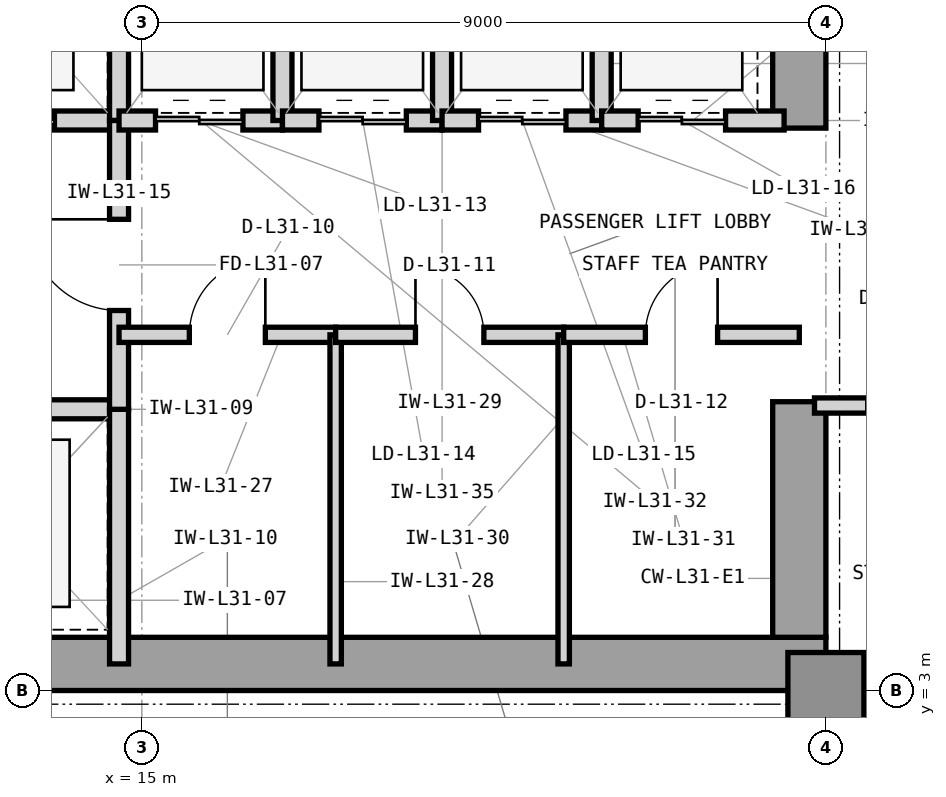
"""IFC4 building model, lengths in metres.
Left out: names, types, materials, properties, quantities, classifications, styles, units other than length and angle.
Written with IfcOpenShell. Run it as: python <this file> out.ifc"""

import sys

from ifc_helpers import new_model, si_unit, direction, frame, frame_2d, origin, origin_2d, place, context, subcontext, project, spatial, rectangle, extrude, element, fill, save


model = new_model("IFC4")
c1 = context("Model", 3, precision=1e-05, world=origin(), true_north=direction((0.0, 1.0)))
c2 = subcontext(c1, "Body", "Model", "MODEL_VIEW")
j1 = project(units=[si_unit("LENGTHUNIT", "METRE"), si_unit("PLANEANGLEUNIT", "RADIAN")], contexts=[c1])
p1 = place(None, origin())
s1 = spatial("IfcSite", under=j1, at=p1, CompositionType="ELEMENT")
p2 = place(p1, origin())
s2 = spatial("IfcBuilding", under=s1, at=p2, CompositionType="ELEMENT")
p3 = place(p2, frame((0.0, 0.0, 132.3)))
s3 = spatial("IfcBuildingStorey", under=s2, at=p3, CompositionType="ELEMENT", Elevation=132.3)
p4 = place(p3, frame((7.475, 3.35, 0.0), z_axis=(0.0, 0.0, 1.0), x_axis=(1.0, 0.0, 0.0)))
e1 = element("IfcWall", 1, at=p4, inside=s3, PredefinedType="SHEAR", context=c2, shape_type="SweptSolid", body=[
    extrude(rectangle(XDim=16.525, YDim=0.7, at=frame_2d((8.262, 0.0))), origin(), (0.0, 0.0, 1.0), 3.9),
])
p5 = place(p3, frame((23.65, 3.7, 0.0), z_axis=(0.0, 0.0, 1.0), x_axis=(0.0, 1.0, 0.0)))
e2 = element("IfcWall", 2, at=p5, inside=s3, PredefinedType="SHEAR", context=c2, shape_type="SweptSolid", body=[
    extrude(rectangle(XDim=3.1, YDim=0.7, at=frame_2d((1.55, 0.0))), origin(), (0.0, 0.0, 1.0), 3.9),
])
p6 = place(p3, frame((23.65, 10.4, 0.0), z_axis=(0.0, 0.0, 1.0), x_axis=(0.0, 1.0, 0.0)))
e3 = element("IfcWall", 3, at=p6, inside=s3, PredefinedType="SHEAR", context=c2, shape_type="SweptSolid", body=[
    extrude(rectangle(XDim=3.2, YDim=0.7, at=frame_2d((1.6, 0.0))), origin(), (0.0, 0.0, 1.0), 3.9),
])
p7 = place(p3, frame((24.0, 3.0, 0.0), z_axis=(0.0, 0.0, 1.0), x_axis=(1.0, 0.0, 0.0)))
e4 = element("IfcColumn", 4, at=p7, inside=s3, PredefinedType="COLUMN", context=c2, shape_type="SweptSolid", body=[
    extrude(rectangle(XDim=1.0, YDim=1.0, at=origin_2d()), origin(), (0.0, 0.0, 1.0), 3.9),
])
p8 = place(p3, frame((23.9, 3.21, 0.0), z_axis=(0.0, 0.0, 1.0), x_axis=(1.0, 0.0, 0.0)))
e5 = element("IfcWall", 5, at=p8, inside=s3, PredefinedType="STANDARD", context=c2, shape_type="SweptSolid", body=[
    extrude(rectangle(XDim=34.5, YDim=0.42, at=frame_2d((17.25, 0.0))), origin(), (0.0, 0.0, 1.0), 3.7),
])
p9 = place(p8, frame((11.071, 0.0, 0.85)))
e6 = element("IfcOpeningElement", 6, at=p9, cuts=e5, PredefinedType="OPENING", context=c2, shape_type="SweptSolid", body=[
    extrude(rectangle(XDim=2.5, YDim=2.25, at=frame_2d((1.25, 1.125))), frame((0.0, 0.22, 0.0), z_axis=(0.0, -1.0, 0.0), x_axis=(1.0, 0.0, 0.0)), (0.0, 0.0, 1.0), 0.44),
])
p10 = place(p8, frame((1.1, 0.0, 0.85)))
e7 = element("IfcOpeningElement", 7, at=p10, cuts=e5, PredefinedType="OPENING", context=c2, shape_type="SweptSolid", body=[
    extrude(rectangle(XDim=1.2, YDim=2.25, at=frame_2d((0.6, 1.125))), frame((0.0, 0.22, 0.0), z_axis=(0.0, -1.0, 0.0), x_axis=(1.0, 0.0, 0.0)), (0.0, 0.0, 1.0), 0.44),
])
p11 = place(p8, frame((5.036, 0.0, 0.85)))
e8 = element("IfcOpeningElement", 8, at=p11, cuts=e5, PredefinedType="OPENING", context=c2, shape_type="SweptSolid", body=[
    extrude(rectangle(XDim=2.5, YDim=2.25, at=frame_2d((1.25, 1.125))), frame((0.0, 0.22, 0.0), z_axis=(0.0, -1.0, 0.0), x_axis=(1.0, 0.0, 0.0)), (0.0, 0.0, 1.0), 0.44),
])
p12 = place(p8, frame((19.786, 0.0, 0.85)))
e9 = element("IfcOpeningElement", 9, at=p12, cuts=e5, PredefinedType="OPENING", context=c2, shape_type="SweptSolid", body=[
    extrude(rectangle(XDim=2.5, YDim=2.25, at=frame_2d((1.25, 1.125))), frame((0.0, 0.22, 0.0), z_axis=(0.0, -1.0, 0.0), x_axis=(1.0, 0.0, 0.0)), (0.0, 0.0, 1.0), 0.44),
])
p13 = place(p8, frame((25.086, 0.0, 0.85)))
e10 = element("IfcOpeningElement", 10, at=p13, cuts=e5, PredefinedType="OPENING", context=c2, shape_type="SweptSolid", body=[
    extrude(rectangle(XDim=1.2, YDim=2.25, at=frame_2d((0.6, 1.125))), frame((0.0, 0.22, 0.0), z_axis=(0.0, -1.0, 0.0), x_axis=(1.0, 0.0, 0.0)), (0.0, 0.0, 1.0), 0.44),
])
p14 = place(p3, frame((11.82, 6.7, 0.0), z_axis=(0.0, 0.0, 1.0), x_axis=(1.0, 0.0, 0.0)))
e11 = element("IfcWall", 11, at=p14, inside=s3, PredefinedType="PARTITIONING", context=c2, shape_type="SweptSolid", body=[
    extrude(rectangle(XDim=2.88, YDim=0.25, at=frame_2d((1.44, 0.0))), origin(), (0.0, 0.0, 1.0), 3.233),
])
p15 = place(p14, frame((0.85, 0.0, 0.0)))
e12 = element("IfcOpeningElement", 12, at=p15, cuts=e11, PredefinedType="OPENING", context=c2, shape_type="SweptSolid", body=[
    extrude(rectangle(XDim=1.1, YDim=2.25, at=frame_2d((0.55, 1.125))), frame((0.0, 0.135, 0.0), z_axis=(0.0, -1.0, 0.0), x_axis=(1.0, 0.0, 0.0)), (0.0, 0.0, 1.0), 0.27),
])
p16 = place(p3, frame((14.7, 3.35, 0.0), z_axis=(0.0, 0.0, 1.0), x_axis=(0.0, 1.0, 0.0)))
e13 = element("IfcWall", 13, at=p16, inside=s3, PredefinedType="PARTITIONING", context=c2, shape_type="SweptSolid", body=[
    extrude(rectangle(XDim=3.35, YDim=0.25, at=frame_2d((1.675, 0.0))), origin(), (0.0, 0.0, 1.0), 3.69),
])
p17 = place(p3, frame((11.95, 10.5, 0.0), z_axis=(0.0, 0.0, 1.0), x_axis=(1.0, 0.0, 0.0)))
e14 = element("IfcWall", 14, at=p17, inside=s3, PredefinedType="PARTITIONING", context=c2, shape_type="SweptSolid", body=[
    extrude(rectangle(XDim=2.75, YDim=0.25, at=frame_2d((1.375, 0.0))), origin(), (0.0, 0.0, 1.0), 3.233),
])
p18 = place(p17, frame((0.8, 0.0, 0.0)))
e15 = element("IfcOpeningElement", 15, at=p18, cuts=e14, PredefinedType="OPENING", context=c2, shape_type="SweptSolid", body=[
    extrude(rectangle(XDim=1.1, YDim=2.25, at=frame_2d((0.55, 1.125))), frame((0.0, 0.135, 0.0), z_axis=(0.0, -1.0, 0.0), x_axis=(1.0, 0.0, 0.0)), (0.0, 0.0, 1.0), 0.27),
])
p19 = place(p3, frame((14.7, 10.5, 0.0), z_axis=(0.0, 0.0, 1.0), x_axis=(0.0, 1.0, 0.0)))
e16 = element("IfcWall", 16, at=p19, inside=s3, PredefinedType="PARTITIONING", context=c2, shape_type="SweptSolid", body=[
    extrude(rectangle(XDim=3.0, YDim=0.25, at=frame_2d((1.5, 0.0))), origin(), (0.0, 0.0, 1.0), 3.69),
])
p20 = place(p3, frame((14.7, 6.7, 0.0), z_axis=(0.0, 0.0, 1.0), x_axis=(0.0, 1.0, 0.0)))
e17 = element("IfcWall", 17, at=p20, inside=s3, PredefinedType="PARTITIONING", context=c2, shape_type="SweptSolid", body=[
    extrude(rectangle(XDim=3.8, YDim=0.25, at=frame_2d((1.9, 0.0))), origin(), (0.0, 0.0, 1.0), 3.69),
])
p21 = place(p20, frame((1.3, 0.0, 0.0)))
e18 = element("IfcOpeningElement", 18, at=p21, cuts=e17, PredefinedType="OPENING", context=c2, shape_type="SweptSolid", body=[
    extrude(rectangle(XDim=1.2, YDim=2.2, at=frame_2d((0.6, 1.1))), frame((0.0, 0.135, 0.0), z_axis=(0.0, -1.0, 0.0), x_axis=(1.0, 0.0, 0.0)), (0.0, 0.0, 1.0), 0.27),
])
p22 = place(p3, frame((14.7, 7.68, 0.0), z_axis=(0.0, 0.0, 1.0), x_axis=(1.0, 0.0, 0.0)))
e19 = element("IfcWall", 19, at=p22, inside=s3, PredefinedType="PARTITIONING", context=c2, shape_type="SweptSolid", body=[
    extrude(rectangle(XDim=2.85, YDim=0.2, at=frame_2d((1.425, 0.0))), origin(), (0.0, 0.0, 1.0), 3.69),
])
p23 = place(p22, frame((0.925, 0.0, 0.0)))
e20 = element("IfcOpeningElement", 20, at=p23, cuts=e19, PredefinedType="OPENING", context=c2, shape_type="SweptSolid", body=[
    extrude(rectangle(XDim=1.0, YDim=2.15, at=frame_2d((0.5, 1.075))), frame((0.0, 0.11, 0.0), z_axis=(0.0, -1.0, 0.0), x_axis=(1.0, 0.0, 0.0)), (0.0, 0.0, 1.0), 0.22),
])
p24 = place(p3, frame((17.55, 3.35, 0.0), z_axis=(0.0, 0.0, 1.0), x_axis=(0.0, 1.0, 0.0)))
e21 = element("IfcWall", 21, at=p24, inside=s3, PredefinedType="PARTITIONING", context=c2, shape_type="SweptSolid", body=[
    extrude(rectangle(XDim=4.33, YDim=0.15, at=frame_2d((2.165, 0.0))), origin(), (0.0, 0.0, 1.0), 3.69),
])
p25 = place(p3, frame((17.55, 7.68, 0.0), z_axis=(0.0, 0.0, 1.0), x_axis=(1.0, 0.0, 0.0)))
e22 = element("IfcWall", 22, at=p25, inside=s3, PredefinedType="PARTITIONING", context=c2, shape_type="SweptSolid", body=[
    extrude(rectangle(XDim=3.0, YDim=0.2, at=frame_2d((1.5, 0.0))), origin(), (0.0, 0.0, 1.0), 3.69),
])
p26 = place(p25, frame((1.05, 0.0, 0.0)))
e23 = element("IfcOpeningElement", 23, at=p26, cuts=e22, PredefinedType="OPENING", context=c2, shape_type="SweptSolid", body=[
    extrude(rectangle(XDim=0.9, YDim=2.1, at=frame_2d((0.45, 1.05))), frame((0.0, 0.11, 0.0), z_axis=(0.0, -1.0, 0.0), x_axis=(1.0, 0.0, 0.0)), (0.0, 0.0, 1.0), 0.22),
])
p27 = place(p3, frame((20.55, 3.35, 0.0), z_axis=(0.0, 0.0, 1.0), x_axis=(0.0, 1.0, 0.0)))
e24 = element("IfcWall", 24, at=p27, inside=s3, PredefinedType="PARTITIONING", context=c2, shape_type="SweptSolid", body=[
    extrude(rectangle(XDim=4.33, YDim=0.15, at=frame_2d((2.165, 0.0))), origin(), (0.0, 0.0, 1.0), 3.69),
])
p28 = place(p3, frame((20.55, 7.68, 0.0), z_axis=(0.0, 0.0, 1.0), x_axis=(1.0, 0.0, 0.0)))
e25 = element("IfcWall", 25, at=p28, inside=s3, PredefinedType="PARTITIONING", context=c2, shape_type="SweptSolid", body=[
    extrude(rectangle(XDim=3.1, YDim=0.2, at=frame_2d((1.55, 0.0))), origin(), (0.0, 0.0, 1.0), 3.69),
])
p29 = place(p28, frame((1.075, 0.0, 0.0)))
e26 = element("IfcOpeningElement", 26, at=p29, cuts=e25, PredefinedType="OPENING", context=c2, shape_type="SweptSolid", body=[
    extrude(rectangle(XDim=0.95, YDim=2.1, at=frame_2d((0.475, 1.05))), frame((0.0, 0.11, 0.0), z_axis=(0.0, -1.0, 0.0), x_axis=(1.0, 0.0, 0.0)), (0.0, 0.0, 1.0), 0.22),
])
p30 = place(p3, frame((14.7, 10.5, 0.0), z_axis=(0.0, 0.0, 1.0), x_axis=(1.0, 0.0, 0.0)))
e27 = element("IfcWall", 27, at=p30, inside=s3, PredefinedType="PARTITIONING", context=c2, shape_type="SweptSolid", body=[
    extrude(rectangle(XDim=2.15, YDim=0.25, at=frame_2d((1.075, 0.0))), origin(), (0.0, 0.0, 1.0), 3.233),
])
p31 = place(p30, frame((0.48, 0.0, 0.0)))
e28 = element("IfcOpeningElement", 28, at=p31, cuts=e27, PredefinedType="OPENING", context=c2, shape_type="SweptSolid", body=[
    extrude(rectangle(XDim=1.15, YDim=2.25, at=frame_2d((0.575, 1.125))), frame((0.0, 0.135, 0.0), z_axis=(0.0, -1.0, 0.0), x_axis=(1.0, 0.0, 0.0)), (0.0, 0.0, 1.0), 0.27),
])
p32 = place(p3, frame((16.85, 10.5, 0.0), z_axis=(0.0, 0.0, 1.0), x_axis=(0.0, 1.0, 0.0)))
e29 = element("IfcWall", 29, at=p32, inside=s3, PredefinedType="PARTITIONING", context=c2, shape_type="SweptSolid", body=[
    extrude(rectangle(XDim=3.0, YDim=0.25, at=frame_2d((1.5, 0.0))), origin(), (0.0, 0.0, 1.0), 3.69),
])
p33 = place(p3, frame((16.85, 10.5, 0.0), z_axis=(0.0, 0.0, 1.0), x_axis=(1.0, 0.0, 0.0)))
e30 = element("IfcWall", 30, at=p33, inside=s3, PredefinedType="PARTITIONING", context=c2, shape_type="SweptSolid", body=[
    extrude(rectangle(XDim=2.1, YDim=0.25, at=frame_2d((1.05, 0.0))), origin(), (0.0, 0.0, 1.0), 3.233),
])
p34 = place(p33, frame((0.48, 0.0, 0.0)))
e31 = element("IfcOpeningElement", 31, at=p34, cuts=e30, PredefinedType="OPENING", context=c2, shape_type="SweptSolid", body=[
    extrude(rectangle(XDim=1.15, YDim=2.25, at=frame_2d((0.575, 1.125))), frame((0.0, 0.135, 0.0), z_axis=(0.0, -1.0, 0.0), x_axis=(1.0, 0.0, 0.0)), (0.0, 0.0, 1.0), 0.27),
])
p35 = place(p3, frame((18.95, 10.5, 0.0), z_axis=(0.0, 0.0, 1.0), x_axis=(0.0, 1.0, 0.0)))
e32 = element("IfcWall", 32, at=p35, inside=s3, PredefinedType="PARTITIONING", context=c2, shape_type="SweptSolid", body=[
    extrude(rectangle(XDim=3.0, YDim=0.25, at=frame_2d((1.5, 0.0))), origin(), (0.0, 0.0, 1.0), 3.69),
])
p36 = place(p3, frame((18.95, 10.5, 0.0), z_axis=(0.0, 0.0, 1.0), x_axis=(1.0, 0.0, 0.0)))
e33 = element("IfcWall", 33, at=p36, inside=s3, PredefinedType="PARTITIONING", context=c2, shape_type="SweptSolid", body=[
    extrude(rectangle(XDim=2.1, YDim=0.25, at=frame_2d((1.05, 0.0))), origin(), (0.0, 0.0, 1.0), 3.233),
])
p37 = place(p36, frame((0.48, 0.0, 0.0)))
e34 = element("IfcOpeningElement", 34, at=p37, cuts=e33, PredefinedType="OPENING", context=c2, shape_type="SweptSolid", body=[
    extrude(rectangle(XDim=1.15, YDim=2.25, at=frame_2d((0.575, 1.125))), frame((0.0, 0.135, 0.0), z_axis=(0.0, -1.0, 0.0), x_axis=(1.0, 0.0, 0.0)), (0.0, 0.0, 1.0), 0.27),
])
p38 = place(p3, frame((21.05, 10.5, 0.0), z_axis=(0.0, 0.0, 1.0), x_axis=(0.0, 1.0, 0.0)))
e35 = element("IfcWall", 35, at=p38, inside=s3, PredefinedType="PARTITIONING", context=c2, shape_type="SweptSolid", body=[
    extrude(rectangle(XDim=3.0, YDim=0.25, at=frame_2d((1.5, 0.0))), origin(), (0.0, 0.0, 1.0), 3.69),
])
p39 = place(p3, frame((21.05, 10.5, 0.0), z_axis=(0.0, 0.0, 1.0), x_axis=(1.0, 0.0, 0.0)))
e36 = element("IfcWall", 36, at=p39, inside=s3, PredefinedType="PARTITIONING", context=c2, shape_type="SweptSolid", body=[
    extrude(rectangle(XDim=2.4, YDim=0.25, at=frame_2d((1.2, 0.0))), origin(), (0.0, 0.0, 1.0), 3.233),
])
p40 = place(p39, frame((0.48, 0.0, 0.0)))
e37 = element("IfcOpeningElement", 37, at=p40, cuts=e36, PredefinedType="OPENING", context=c2, shape_type="SweptSolid", body=[
    extrude(rectangle(XDim=1.15, YDim=2.25, at=frame_2d((0.575, 1.125))), frame((0.0, 0.135, 0.0), z_axis=(0.0, -1.0, 0.0), x_axis=(1.0, 0.0, 0.0)), (0.0, 0.0, 1.0), 0.27),
])
p41 = place(p3, frame((23.85, 6.75, 0.0), z_axis=(0.0, 0.0, 1.0), x_axis=(1.0, 0.0, 0.0)))
e38 = element("IfcWall", 38, at=p41, inside=s3, PredefinedType="PARTITIONING", context=c2, shape_type="SweptSolid", body=[
    extrude(rectangle(XDim=2.85, YDim=0.2, at=frame_2d((1.425, 0.0))), origin(), (0.0, 0.0, 1.0), 3.69),
])
p42 = place(p41, frame((0.7, 0.0, 0.0)))
e39 = element("IfcOpeningElement", 39, at=p42, cuts=e38, PredefinedType="OPENING", context=c2, shape_type="SweptSolid", body=[
    extrude(rectangle(XDim=1.0, YDim=2.15, at=frame_2d((0.5, 1.075))), frame((0.0, 0.11, 0.0), z_axis=(0.0, -1.0, 0.0), x_axis=(1.0, 0.0, 0.0)), (0.0, 0.0, 1.0), 0.22),
])
p43 = place(p18, origin())
e40 = element("IfcDoor", 40, at=p43, inside=s3, OperationType="DOUBLE_DOOR_SLIDING", PredefinedType="DOOR", context=c2, shape_type="SweptSolid", body=[
    extrude(rectangle(XDim=1.1, YDim=2.25, at=frame_2d((0.55, 1.125))), frame((0.0, 0.025, 0.0), z_axis=(0.0, -1.0, 0.0), x_axis=(1.0, 0.0, 0.0)), (0.0, 0.0, 1.0), 0.05),
])
fill(e15, e40)
p44 = place(p21, origin())
e41 = element("IfcDoor", 41, at=p44, inside=s3, OperationType="SINGLE_SWING_RIGHT", PredefinedType="DOOR", context=c2, shape_type="SweptSolid", body=[
    extrude(rectangle(XDim=1.2, YDim=2.2, at=frame_2d((0.6, 1.1))), frame((0.0, 0.025, 0.0), z_axis=(0.0, -1.0, 0.0), x_axis=(1.0, 0.0, 0.0)), (0.0, 0.0, 1.0), 0.05),
])
fill(e18, e41)
p45 = place(p23, origin())
e42 = element("IfcDoor", 42, at=p45, inside=s3, OperationType="SINGLE_SWING_RIGHT", PredefinedType="DOOR", context=c2, shape_type="SweptSolid", body=[
    extrude(rectangle(XDim=1.0, YDim=2.15, at=frame_2d((0.5, 1.075))), frame((0.0, 0.025, 0.0), z_axis=(0.0, -1.0, 0.0), x_axis=(1.0, 0.0, 0.0)), (0.0, 0.0, 1.0), 0.05),
])
fill(e20, e42)
p46 = place(p26, origin())
e43 = element("IfcDoor", 43, at=p46, inside=s3, OperationType="SINGLE_SWING_LEFT", PredefinedType="TRAPDOOR", context=c2, shape_type="SweptSolid", body=[
    extrude(rectangle(XDim=0.9, YDim=2.1, at=frame_2d((0.45, 1.05))), frame((0.0, 0.025, 0.0), z_axis=(0.0, -1.0, 0.0), x_axis=(1.0, 0.0, 0.0)), (0.0, 0.0, 1.0), 0.05),
])
fill(e23, e43)
p47 = place(p29, origin())
e44 = element("IfcDoor", 44, at=p47, inside=s3, OperationType="SINGLE_SWING_RIGHT", PredefinedType="DOOR", context=c2, shape_type="SweptSolid", body=[
    extrude(rectangle(XDim=0.95, YDim=2.1, at=frame_2d((0.475, 1.05))), frame((0.0, 0.025, 0.0), z_axis=(0.0, -1.0, 0.0), x_axis=(1.0, 0.0, 0.0)), (0.0, 0.0, 1.0), 0.05),
])
fill(e26, e44)
p48 = place(p31, origin())
e45 = element("IfcDoor", 45, at=p48, inside=s3, OperationType="DOUBLE_DOOR_SLIDING", PredefinedType="DOOR", context=c2, shape_type="SweptSolid", body=[
    extrude(rectangle(XDim=1.15, YDim=2.25, at=frame_2d((0.575, 1.125))), frame((0.0, 0.025, 0.0), z_axis=(0.0, -1.0, 0.0), x_axis=(1.0, 0.0, 0.0)), (0.0, 0.0, 1.0), 0.05),
])
fill(e28, e45)
p49 = place(p34, origin())
e46 = element("IfcDoor", 46, at=p49, inside=s3, OperationType="DOUBLE_DOOR_SLIDING", PredefinedType="DOOR", context=c2, shape_type="SweptSolid", body=[
    extrude(rectangle(XDim=1.15, YDim=2.25, at=frame_2d((0.575, 1.125))), frame((0.0, 0.025, 0.0), z_axis=(0.0, -1.0, 0.0), x_axis=(1.0, 0.0, 0.0)), (0.0, 0.0, 1.0), 0.05),
])
fill(e31, e46)
p50 = place(p37, origin())
e47 = element("IfcDoor", 47, at=p50, inside=s3, OperationType="DOUBLE_DOOR_SLIDING", PredefinedType="DOOR", context=c2, shape_type="SweptSolid", body=[
    extrude(rectangle(XDim=1.15, YDim=2.25, at=frame_2d((0.575, 1.125))), frame((0.0, 0.025, 0.0), z_axis=(0.0, -1.0, 0.0), x_axis=(1.0, 0.0, 0.0)), (0.0, 0.0, 1.0), 0.05),
])
fill(e34, e47)
p51 = place(p40, origin())
e48 = element("IfcDoor", 48, at=p51, inside=s3, OperationType="DOUBLE_DOOR_SLIDING", PredefinedType="DOOR", context=c2, shape_type="SweptSolid", body=[
    extrude(rectangle(XDim=1.15, YDim=2.25, at=frame_2d((0.575, 1.125))), frame((0.0, 0.025, 0.0), z_axis=(0.0, -1.0, 0.0), x_axis=(1.0, 0.0, 0.0)), (0.0, 0.0, 1.0), 0.05),
])
fill(e37, e48)
save(model, sys.argv[1])
